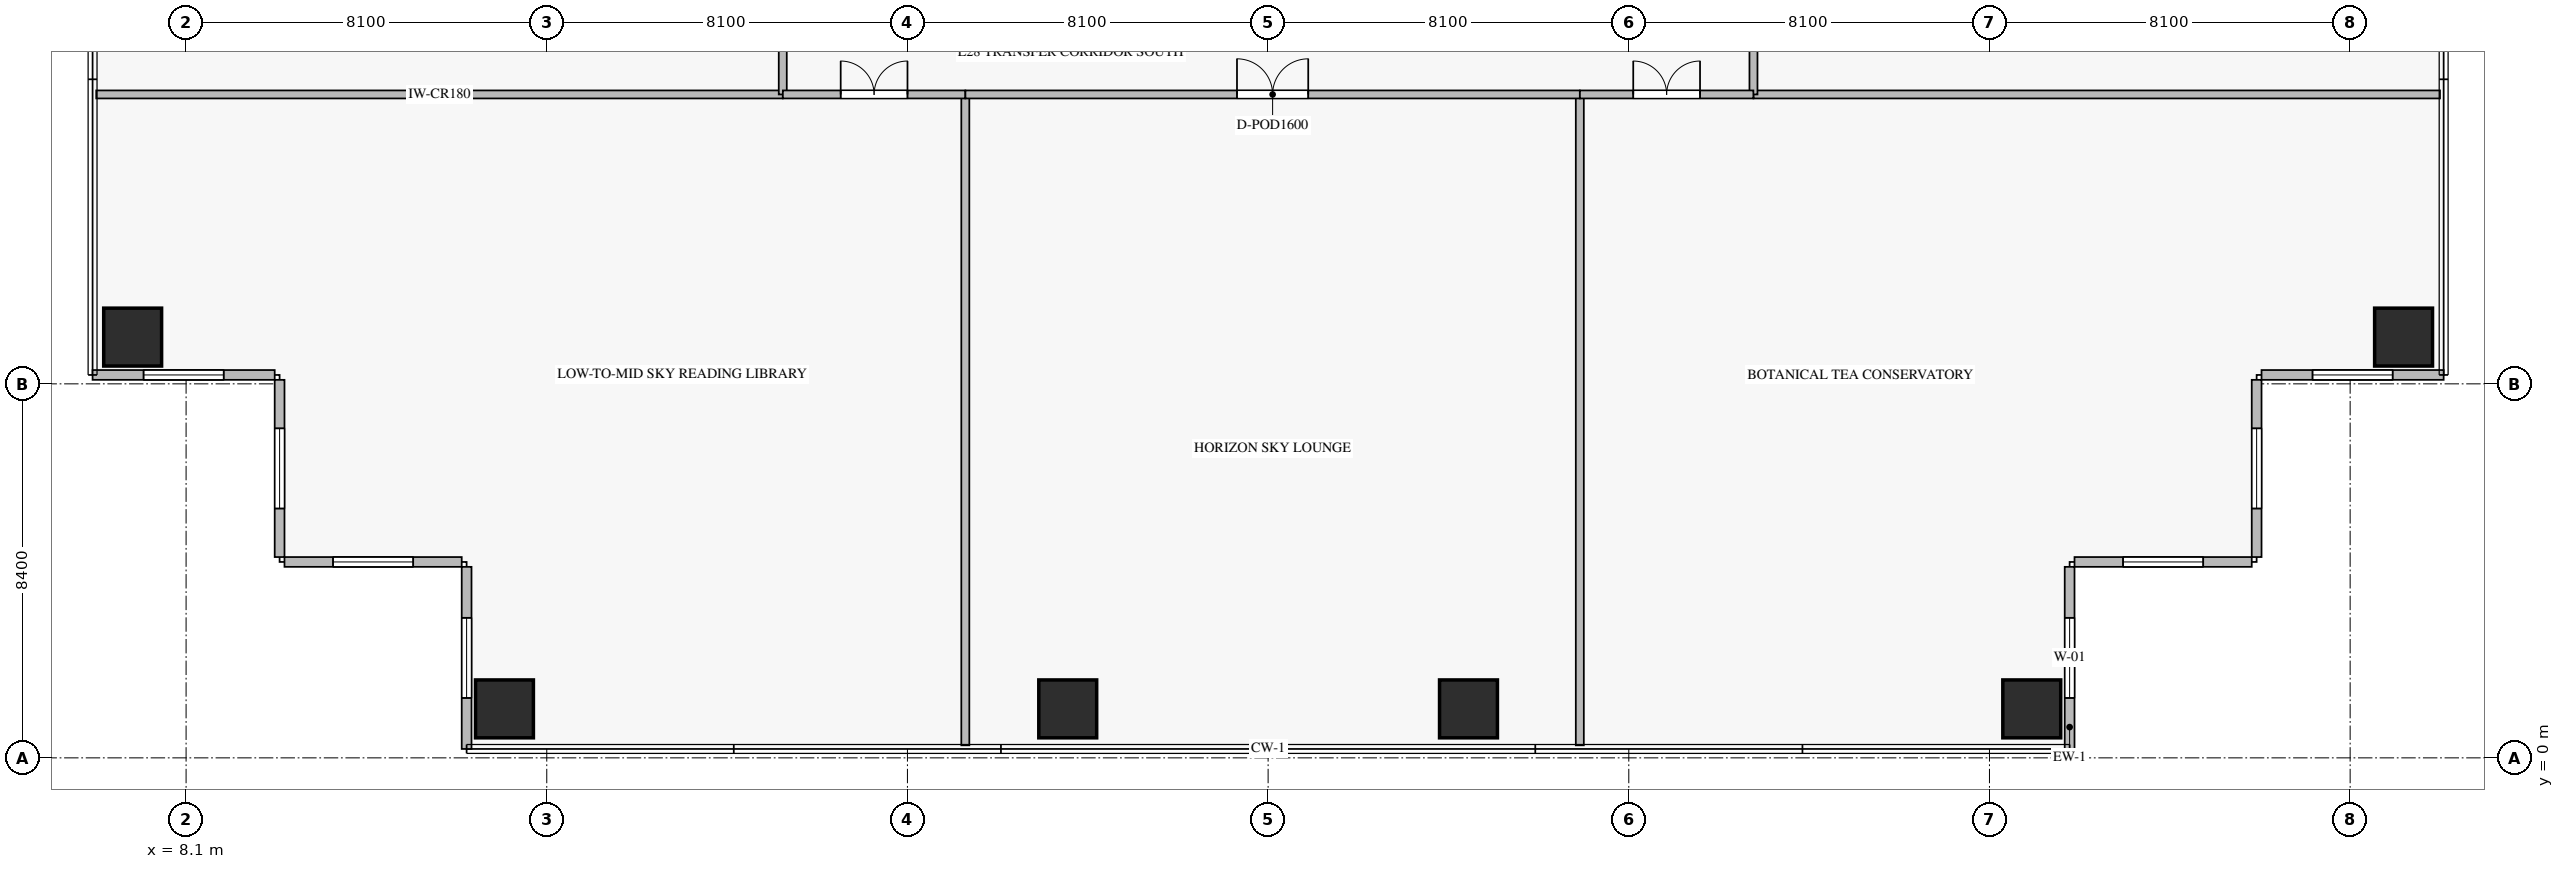
"""IFC4 building model, lengths in metres.
Left out: names, types, materials, properties, quantities, classifications, styles, units other than length and angle.
Written with IfcOpenShell. Run it as: python <this file> out.ifc"""

import sys

from ifc_helpers import new_model, si_unit, direction, frame, frame_2d, origin, origin_2d, place, context, subcontext, project, spatial, rectangle, extrude, source, transform, mapped, element, fill, save


model = new_model("IFC4")
c1 = context("Model", 3, precision=1e-05, world=origin(), true_north=direction((0.0, 1.0)))
c2 = subcontext(c1, "Body", "Model", "MODEL_VIEW")
j1 = project(units=[si_unit("LENGTHUNIT", "METRE"), si_unit("PLANEANGLEUNIT", "RADIAN")], contexts=[c1])
p1 = place(None, origin())
s1 = spatial("IfcSite", under=j1, at=p1, CompositionType="ELEMENT")
p2 = place(p1, origin())
s2 = spatial("IfcBuilding", under=s1, at=p2, CompositionType="ELEMENT")
p3 = place(p2, frame((0.0, 0.0, 115.2)))
s3 = spatial("IfcBuildingStorey", under=s2, at=p3, CompositionType="ELEMENT", Elevation=115.2)
m1 = source(origin(), c2, "Body", "SweptSolid", [
    extrude(rectangle(XDim=1.3, YDim=1.3, at=origin_2d()), origin(), (0.0, 0.0, 1.0), 4.87),
])
for number, where, z_axis, x_axis in (
    (1, (15.25, 1.1, -0.36), (0.0, 0.0, 1.0), (1.0, 0.0, 0.0)),
    (2, (27.9, 1.1, -0.36), (0.0, 0.0, 1.0), (1.0, 0.0, 0.0)),
    (3, (36.9, 1.1, -0.36), (0.0, 0.0, 1.0), (1.0, 0.0, 0.0)),
    (4, (49.55, 1.1, -0.36), (0.0, 0.0, 1.0), (1.0, 0.0, 0.0)),
    (5, (57.9, 9.45, -0.36), (0.0, 0.0, 1.0), (1.0, 0.0, 0.0)),
    (6, (6.9, 9.45, -0.36), (0.0, 0.0, 1.0), (1.0, 0.0, 0.0)),
):
    element("IfcColumn", number, at=place(p3, frame(where, z_axis=z_axis, x_axis=x_axis)), inside=s3, PredefinedType="COLUMN", context=c2, shape_type="MappedRepresentation", body=[
        mapped(m1, transform((0.0, 0.0, 0.0), scale=1.0)),
    ])
p4 = place(p3, frame((50.4, 0.2, 0.0), z_axis=(0.0, 0.0, 1.0), x_axis=(0.0, 1.0, 0.0)))
e7 = element("IfcWall", 7, at=p4, inside=s3, PredefinedType="ELEMENTEDWALL", context=c2, shape_type="SweptSolid", body=[
    extrude(rectangle(XDim=4.09, YDim=0.22, at=frame_2d((2.045, 0.0))), origin(), (0.0, 0.0, 1.0), 4.495),
])
p5 = place(p4, frame((1.145, 0.0, 0.65)))
e8 = element("IfcOpeningElement", 8, at=p5, cuts=e7, PredefinedType="OPENING", context=c2, shape_type="SweptSolid", body=[
    extrude(rectangle(XDim=1.8, YDim=2.1, at=frame_2d((0.9, 1.05))), frame((0.0, 0.12, 0.0), z_axis=(0.0, -1.0, 0.0), x_axis=(1.0, 0.0, 0.0)), (0.0, 0.0, 1.0), 0.24),
])
p6 = place(p3, frame((50.51, 4.4, 0.0), z_axis=(0.0, 0.0, 1.0), x_axis=(1.0, 0.0, 0.0)))
e9 = element("IfcWall", 9, at=p6, inside=s3, PredefinedType="ELEMENTEDWALL", context=c2, shape_type="SweptSolid", body=[
    extrude(rectangle(XDim=3.98, YDim=0.22, at=frame_2d((1.99, 0.0))), origin(), (0.0, 0.0, 1.0), 4.495),
])
p7 = place(p6, frame((1.09, 0.0, 0.65)))
e10 = element("IfcOpeningElement", 10, at=p7, cuts=e9, PredefinedType="OPENING", context=c2, shape_type="SweptSolid", body=[
    extrude(rectangle(XDim=1.8, YDim=2.1, at=frame_2d((0.9, 1.05))), frame((0.0, 0.12, 0.0), z_axis=(0.0, -1.0, 0.0), x_axis=(1.0, 0.0, 0.0)), (0.0, 0.0, 1.0), 0.24),
])
p8 = place(p3, frame((54.6, 4.51, 0.0), z_axis=(0.0, 0.0, 1.0), x_axis=(0.0, 1.0, 0.0)))
e11 = element("IfcWall", 11, at=p8, inside=s3, PredefinedType="ELEMENTEDWALL", context=c2, shape_type="SweptSolid", body=[
    extrude(rectangle(XDim=3.98, YDim=0.22, at=frame_2d((1.99, 0.0))), origin(), (0.0, 0.0, 1.0), 4.495),
])
p9 = place(p8, frame((1.09, 0.0, 0.65)))
e12 = element("IfcOpeningElement", 12, at=p9, cuts=e11, PredefinedType="OPENING", context=c2, shape_type="SweptSolid", body=[
    extrude(rectangle(XDim=1.8, YDim=2.1, at=frame_2d((0.9, 1.05))), frame((0.0, 0.12, 0.0), z_axis=(0.0, -1.0, 0.0), x_axis=(1.0, 0.0, 0.0)), (0.0, 0.0, 1.0), 0.24),
])
p10 = place(p3, frame((54.71, 8.6, 0.0), z_axis=(0.0, 0.0, 1.0), x_axis=(1.0, 0.0, 0.0)))
e13 = element("IfcWall", 13, at=p10, inside=s3, PredefinedType="ELEMENTEDWALL", context=c2, shape_type="SweptSolid", body=[
    extrude(rectangle(XDim=4.09, YDim=0.22, at=frame_2d((2.045, 0.0))), origin(), (0.0, 0.0, 1.0), 4.495),
])
p11 = place(p10, frame((1.145, 0.0, 0.65)))
e14 = element("IfcOpeningElement", 14, at=p11, cuts=e13, PredefinedType="OPENING", context=c2, shape_type="SweptSolid", body=[
    extrude(rectangle(XDim=1.8, YDim=2.1, at=frame_2d((0.9, 1.05))), frame((0.0, 0.12, 0.0), z_axis=(0.0, -1.0, 0.0), x_axis=(1.0, 0.0, 0.0)), (0.0, 0.0, 1.0), 0.24),
])
p12 = place(p3, frame((6.0, 8.6, 0.0), z_axis=(0.0, 0.0, 1.0), x_axis=(1.0, 0.0, 0.0)))
e15 = element("IfcWall", 15, at=p12, inside=s3, PredefinedType="ELEMENTEDWALL", context=c2, shape_type="SweptSolid", body=[
    extrude(rectangle(XDim=4.09, YDim=0.22, at=frame_2d((2.045, 0.0))), origin(), (0.0, 0.0, 1.0), 4.495),
])
p13 = place(p12, frame((1.145, 0.0, 0.65)))
e16 = element("IfcOpeningElement", 16, at=p13, cuts=e15, PredefinedType="OPENING", context=c2, shape_type="SweptSolid", body=[
    extrude(rectangle(XDim=1.8, YDim=2.1, at=frame_2d((0.9, 1.05))), frame((0.0, 0.12, 0.0), z_axis=(0.0, -1.0, 0.0), x_axis=(1.0, 0.0, 0.0)), (0.0, 0.0, 1.0), 0.24),
])
p14 = place(p3, frame((10.2, 8.49, 0.0), z_axis=(0.0, 0.0, 1.0), x_axis=(0.0, -1.0, 0.0)))
e17 = element("IfcWall", 17, at=p14, inside=s3, PredefinedType="ELEMENTEDWALL", context=c2, shape_type="SweptSolid", body=[
    extrude(rectangle(XDim=3.98, YDim=0.22, at=frame_2d((1.99, 0.0))), origin(), (0.0, 0.0, 1.0), 4.495),
])
p15 = place(p14, frame((1.09, 0.0, 0.65)))
e18 = element("IfcOpeningElement", 18, at=p15, cuts=e17, PredefinedType="OPENING", context=c2, shape_type="SweptSolid", body=[
    extrude(rectangle(XDim=1.8, YDim=2.1, at=frame_2d((0.9, 1.05))), frame((0.0, 0.12, 0.0), z_axis=(0.0, -1.0, 0.0), x_axis=(1.0, 0.0, 0.0)), (0.0, 0.0, 1.0), 0.24),
])
p16 = place(p3, frame((10.31, 4.4, 0.0), z_axis=(0.0, 0.0, 1.0), x_axis=(1.0, 0.0, 0.0)))
e19 = element("IfcWall", 19, at=p16, inside=s3, PredefinedType="ELEMENTEDWALL", context=c2, shape_type="SweptSolid", body=[
    extrude(rectangle(XDim=3.98, YDim=0.22, at=frame_2d((1.99, 0.0))), origin(), (0.0, 0.0, 1.0), 4.495),
])
p17 = place(p16, frame((1.09, 0.0, 0.65)))
e20 = element("IfcOpeningElement", 20, at=p17, cuts=e19, PredefinedType="OPENING", context=c2, shape_type="SweptSolid", body=[
    extrude(rectangle(XDim=1.8, YDim=2.1, at=frame_2d((0.9, 1.05))), frame((0.0, 0.12, 0.0), z_axis=(0.0, -1.0, 0.0), x_axis=(1.0, 0.0, 0.0)), (0.0, 0.0, 1.0), 0.24),
])
p18 = place(p3, frame((14.4, 4.29, 0.0), z_axis=(0.0, 0.0, 1.0), x_axis=(0.0, -1.0, 0.0)))
e21 = element("IfcWall", 21, at=p18, inside=s3, PredefinedType="ELEMENTEDWALL", context=c2, shape_type="SweptSolid", body=[
    extrude(rectangle(XDim=4.09, YDim=0.22, at=frame_2d((2.045, 0.0))), origin(), (0.0, 0.0, 1.0), 4.495),
])
p19 = place(p18, frame((1.145, 0.0, 0.65)))
e22 = element("IfcOpeningElement", 22, at=p19, cuts=e21, PredefinedType="OPENING", context=c2, shape_type="SweptSolid", body=[
    extrude(rectangle(XDim=1.8, YDim=2.1, at=frame_2d((0.9, 1.05))), frame((0.0, 0.12, 0.0), z_axis=(0.0, -1.0, 0.0), x_axis=(1.0, 0.0, 0.0)), (0.0, 0.0, 1.0), 0.24),
])
for number, where, z_axis, x_axis in (
    (23, (6.082, 14.9, 0.0), (0.0, 0.0, 1.0), (1.0, 0.0, 0.0)),
    (24, (43.3, 14.9, 0.0), (0.0, 0.0, 1.0), (1.0, 0.0, 0.0)),
):
    element("IfcWall", number, at=place(p3, frame(where, z_axis=z_axis, x_axis=x_axis)), inside=s3, PredefinedType="PARTITIONING", context=c2, shape_type="SweptSolid", body=[
        extrude(rectangle(XDim=15.418, YDim=0.18, at=frame_2d((7.709, 0.0))), origin(), (0.0, 0.0, 1.0), 4.51),
    ])
p20 = place(p3, frame((21.5, 14.9, 0.0), z_axis=(0.0, 0.0, 1.0), x_axis=(0.0, 1.0, 0.0)))
e25 = element("IfcWall", 25, at=p20, inside=s3, PredefinedType="PARTITIONING", context=c2, shape_type="SweptSolid", body=[
    extrude(rectangle(XDim=20.6, YDim=0.18, at=frame_2d((10.3, 0.0))), origin(), (0.0, 0.0, 1.0), 4.51),
])
p21 = place(p20, frame((9.55, 0.0, 0.0)))
e26 = element("IfcOpeningElement", 26, at=p21, cuts=e25, PredefinedType="OPENING", context=c2, shape_type="SweptSolid", body=[
    extrude(rectangle(XDim=1.5, YDim=2.25, at=frame_2d((0.75, 1.125))), frame((0.0, 0.1, 0.0), z_axis=(0.0, -1.0, 0.0), x_axis=(1.0, 0.0, 0.0)), (0.0, 0.0, 1.0), 0.2),
])
p22 = place(p3, frame((43.3, 14.9, 0.0), z_axis=(0.0, 0.0, 1.0), x_axis=(0.0, 1.0, 0.0)))
e27 = element("IfcWall", 27, at=p22, inside=s3, PredefinedType="PARTITIONING", context=c2, shape_type="SweptSolid", body=[
    extrude(rectangle(XDim=20.6, YDim=0.18, at=frame_2d((10.3, 0.0))), origin(), (0.0, 0.0, 1.0), 4.51),
])
p23 = place(p22, frame((9.55, 0.0, 0.0)))
e28 = element("IfcOpeningElement", 28, at=p23, cuts=e27, PredefinedType="OPENING", context=c2, shape_type="SweptSolid", body=[
    extrude(rectangle(XDim=1.5, YDim=2.25, at=frame_2d((0.75, 1.125))), frame((0.0, 0.1, 0.0), z_axis=(0.0, -1.0, 0.0), x_axis=(1.0, 0.0, 0.0)), (0.0, 0.0, 1.0), 0.2),
])
for number, where, z_axis, x_axis in (
    (29, (25.6, 0.282, 0.0), (0.0, 0.0, 1.0), (0.0, 1.0, 0.0)),
    (30, (39.4, 0.282, 0.0), (0.0, 0.0, 1.0), (0.0, 1.0, 0.0)),
):
    element("IfcWall", number, at=place(p3, frame(where, z_axis=z_axis, x_axis=x_axis)), inside=s3, PredefinedType="PARTITIONING", context=c2, shape_type="SweptSolid", body=[
        extrude(rectangle(XDim=14.618, YDim=0.18, at=frame_2d((7.309, 0.0))), origin(), (0.0, 0.0, 1.0), 4.51),
    ])
p24 = place(p3, frame((21.502, 14.9, 0.0), z_axis=(0.0, 0.0, 1.0), x_axis=(1.0, 0.0, 0.0)))
e31 = element("IfcWall", 31, at=p24, inside=s3, PredefinedType="PARTITIONING", context=c2, shape_type="SweptSolid", body=[
    extrude(rectangle(XDim=4.098, YDim=0.18, at=frame_2d((2.049, 0.0))), origin(), (0.0, 0.0, 1.0), 4.51),
])
p25 = place(p24, frame((1.299, 0.0, 0.0)))
e32 = element("IfcOpeningElement", 32, at=p25, cuts=e31, PredefinedType="OPENING", context=c2, shape_type="SweptSolid", body=[
    extrude(rectangle(XDim=1.5, YDim=2.25, at=frame_2d((0.75, 1.125))), frame((0.0, 0.1, 0.0), z_axis=(0.0, -1.0, 0.0), x_axis=(1.0, 0.0, 0.0)), (0.0, 0.0, 1.0), 0.2),
])
p26 = place(p3, frame((25.602, 14.9, 0.0), z_axis=(0.0, 0.0, 1.0), x_axis=(1.0, 0.0, 0.0)))
e33 = element("IfcWall", 33, at=p26, inside=s3, PredefinedType="PARTITIONING", context=c2, shape_type="SweptSolid", body=[
    extrude(rectangle(XDim=13.798, YDim=0.18, at=frame_2d((6.899, 0.0))), origin(), (0.0, 0.0, 1.0), 4.51),
])
p27 = place(p26, frame((6.099, 0.0, 0.0)))
e34 = element("IfcOpeningElement", 34, at=p27, cuts=e33, PredefinedType="OPENING", context=c2, shape_type="SweptSolid", body=[
    extrude(rectangle(XDim=1.6, YDim=2.3, at=frame_2d((0.8, 1.15))), frame((0.0, 0.1, 0.0), z_axis=(0.0, -1.0, 0.0), x_axis=(1.0, 0.0, 0.0)), (0.0, 0.0, 1.0), 0.2),
])
p28 = place(p3, frame((39.402, 14.9, 0.0), z_axis=(0.0, 0.0, 1.0), x_axis=(1.0, 0.0, 0.0)))
e35 = element("IfcWall", 35, at=p28, inside=s3, PredefinedType="PARTITIONING", context=c2, shape_type="SweptSolid", body=[
    extrude(rectangle(XDim=3.896, YDim=0.18, at=frame_2d((1.948, 0.0))), origin(), (0.0, 0.0, 1.0), 4.51),
])
p29 = place(p28, frame((1.198, 0.0, 0.0)))
e36 = element("IfcOpeningElement", 36, at=p29, cuts=e35, PredefinedType="OPENING", context=c2, shape_type="SweptSolid", body=[
    extrude(rectangle(XDim=1.5, YDim=2.25, at=frame_2d((0.75, 1.125))), frame((0.0, 0.1, 0.0), z_axis=(0.0, -1.0, 0.0), x_axis=(1.0, 0.0, 0.0)), (0.0, 0.0, 1.0), 0.2),
])
m2 = source(origin(), c2, "Body", "SweptSolid", [
    extrude(rectangle(XDim=1.8, YDim=2.1, at=frame_2d((0.9, 1.05))), frame((0.0, 0.03, 0.0), z_axis=(0.0, -1.0, 0.0), x_axis=(1.0, 0.0, 0.0)), (0.0, 0.0, 1.0), 0.06),
])
p30 = place(p5, origin())
e37 = element("IfcWindow", 37, at=p30, inside=s3, PartitioningType="SINGLE_PANEL", PredefinedType="WINDOW", context=c2, shape_type="MappedRepresentation", body=[
    mapped(m2, transform((0.0, 0.0, 0.0), scale=1.0)),
])
fill(e8, e37)
p31 = place(p7, origin())
e38 = element("IfcWindow", 38, at=p31, inside=s3, PartitioningType="SINGLE_PANEL", PredefinedType="WINDOW", context=c2, shape_type="MappedRepresentation", body=[
    mapped(m2, transform((0.0, 0.0, 0.0), scale=1.0)),
])
fill(e10, e38)
p32 = place(p9, origin())
e39 = element("IfcWindow", 39, at=p32, inside=s3, PartitioningType="SINGLE_PANEL", PredefinedType="WINDOW", context=c2, shape_type="MappedRepresentation", body=[
    mapped(m2, transform((0.0, 0.0, 0.0), scale=1.0)),
])
fill(e12, e39)
p33 = place(p11, origin())
e40 = element("IfcWindow", 40, at=p33, inside=s3, PartitioningType="SINGLE_PANEL", PredefinedType="WINDOW", context=c2, shape_type="MappedRepresentation", body=[
    mapped(m2, transform((0.0, 0.0, 0.0), scale=1.0)),
])
fill(e14, e40)
p34 = place(p13, origin())
e41 = element("IfcWindow", 41, at=p34, inside=s3, PartitioningType="SINGLE_PANEL", PredefinedType="WINDOW", context=c2, shape_type="MappedRepresentation", body=[
    mapped(m2, transform((0.0, 0.0, 0.0), scale=1.0)),
])
fill(e16, e41)
p35 = place(p15, origin())
e42 = element("IfcWindow", 42, at=p35, inside=s3, PartitioningType="SINGLE_PANEL", PredefinedType="WINDOW", context=c2, shape_type="MappedRepresentation", body=[
    mapped(m2, transform((0.0, 0.0, 0.0), scale=1.0)),
])
fill(e18, e42)
p36 = place(p17, origin())
e43 = element("IfcWindow", 43, at=p36, inside=s3, PartitioningType="SINGLE_PANEL", PredefinedType="WINDOW", context=c2, shape_type="MappedRepresentation", body=[
    mapped(m2, transform((0.0, 0.0, 0.0), scale=1.0)),
])
fill(e20, e43)
p37 = place(p19, origin())
e44 = element("IfcWindow", 44, at=p37, inside=s3, PartitioningType="SINGLE_PANEL", PredefinedType="WINDOW", context=c2, shape_type="MappedRepresentation", body=[
    mapped(m2, transform((0.0, 0.0, 0.0), scale=1.0)),
])
fill(e22, e44)
m3 = source(origin(), c2, "Body", "SweptSolid", [
    extrude(rectangle(XDim=1.5, YDim=2.25, at=frame_2d((0.75, 1.125))), frame((0.0, 0.025, 0.0), z_axis=(0.0, -1.0, 0.0), x_axis=(1.0, 0.0, 0.0)), (0.0, 0.0, 1.0), 0.05),
])
p38 = place(p25, origin())
e45 = element("IfcDoor", 45, at=p38, inside=s3, OperationType="DOUBLE_DOOR_SINGLE_SWING", PredefinedType="DOOR", context=c2, shape_type="MappedRepresentation", body=[
    mapped(m3, transform((0.0, 0.0, 0.0), scale=1.0)),
])
fill(e32, e45)
m4 = source(origin(), c2, "Body", "SweptSolid", [
    extrude(rectangle(XDim=1.6, YDim=2.3, at=frame_2d((0.8, 1.15))), frame((0.0, 0.025, 0.0), z_axis=(0.0, -1.0, 0.0), x_axis=(1.0, 0.0, 0.0)), (0.0, 0.0, 1.0), 0.05),
])
p39 = place(p27, origin())
e46 = element("IfcDoor", 46, at=p39, inside=s3, OperationType="DOUBLE_DOOR_SINGLE_SWING", PredefinedType="DOOR", context=c2, shape_type="MappedRepresentation", body=[
    mapped(m4, transform((0.0, 0.0, 0.0), scale=1.0)),
])
fill(e34, e46)
p40 = place(p29, origin())
e47 = element("IfcDoor", 47, at=p40, inside=s3, OperationType="DOUBLE_DOOR_SINGLE_SWING", PredefinedType="DOOR", context=c2, shape_type="MappedRepresentation", body=[
    mapped(m3, transform((0.0, 0.0, 0.0), scale=1.0)),
])
fill(e36, e47)
save(model, sys.argv[1])
